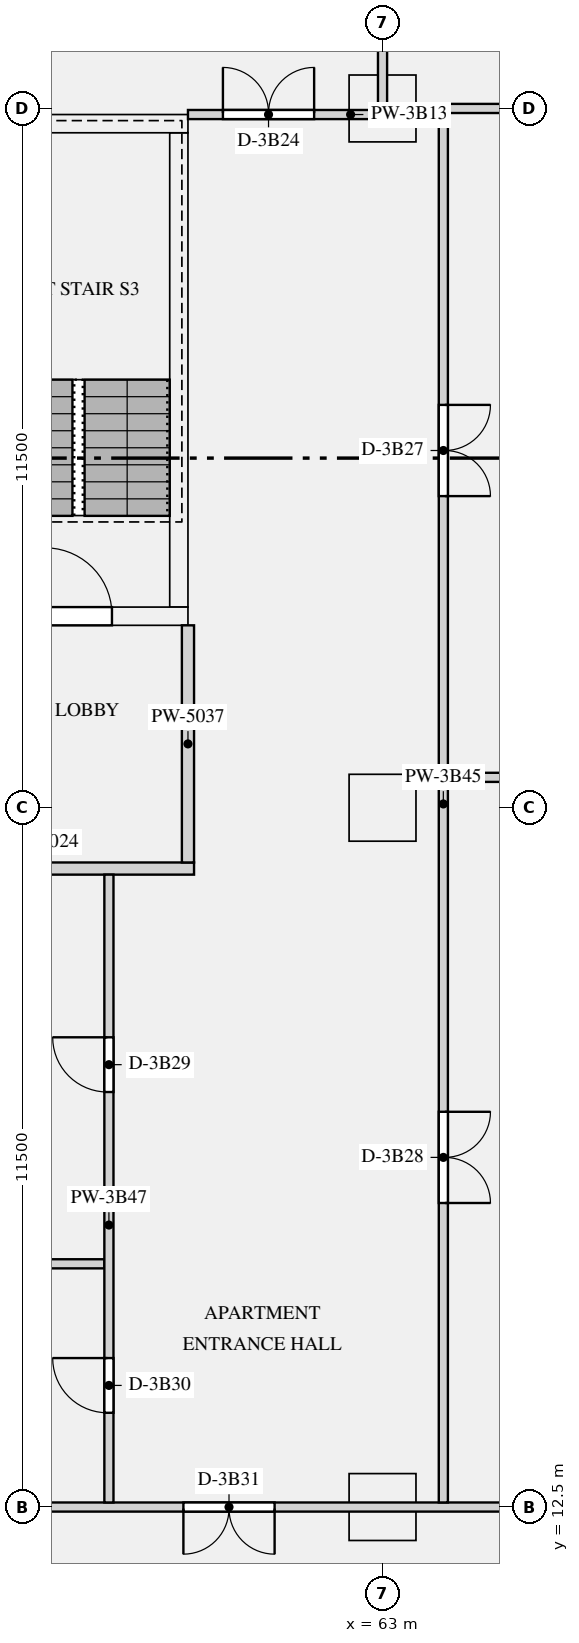
"""IFC4 building model, lengths in metres.
Left out: names, types, materials, properties, quantities, classifications, styles, units other than length and angle.
Written with IfcOpenShell. Run it as: python <this file> out.ifc"""

import sys

from ifc_helpers import new_model, si_unit, direction, frame, frame_2d, origin, origin_2d, place, context, subcontext, project, spatial, rectangle, extrude, element, fill, save


model = new_model("IFC4")
c1 = context("Model", 3, precision=1e-05, world=origin(), true_north=direction((0.0, 1.0)))
c2 = subcontext(c1, "Body", "Model", "MODEL_VIEW")
j1 = project(units=[si_unit("LENGTHUNIT", "METRE"), si_unit("PLANEANGLEUNIT", "RADIAN")], contexts=[c1])
p1 = place(None, origin())
s1 = spatial("IfcSite", under=j1, at=p1, CompositionType="ELEMENT")
p2 = place(p1, origin())
s2 = spatial("IfcBuilding", under=s1, at=p2, CompositionType="ELEMENT")
p3 = place(p2, frame((0.0, 0.0, 150.75)))
s3 = spatial("IfcBuildingStorey", under=s2, at=p3, CompositionType="ELEMENT", Elevation=150.75)
for number, where, z_axis, x_axis in (
    (1, (63.0, 24.0, 0.0), (0.0, 0.0, 1.0), (1.0, 0.0, 0.0)),
    (2, (63.0, 35.5, 0.0), (0.0, 0.0, 1.0), (1.0, 0.0, 0.0)),
    (3, (63.0, 12.5, 0.0), (0.0, 0.0, 1.0), (1.0, 0.0, 0.0)),
):
    element("IfcColumn", number, at=place(p3, frame(where, z_axis=z_axis, x_axis=x_axis)), inside=s3, PredefinedType="COLUMN", context=c2, shape_type="SweptSolid", body=[
        extrude(rectangle(XDim=1.1, YDim=1.1, at=origin_2d()), origin(), (0.0, 0.0, 1.0), 3.15),
    ])
p4 = place(p3, frame((56.2, 27.15, 0.0), z_axis=(0.0, 0.0, 1.0), x_axis=(1.0, 0.0, 0.0)))
e4 = element("IfcWall", 4, at=p4, inside=s3, PredefinedType="SHEAR", context=c2, shape_type="SweptSolid", body=[
    extrude(rectangle(XDim=3.6, YDim=0.3, at=frame_2d((1.8, 0.0))), origin(), (0.0, 0.0, 1.0), 3.15),
])
p5 = place(p4, frame((1.25, 0.0, 0.0)))
e5 = element("IfcOpeningElement", 5, at=p5, cuts=e4, PredefinedType="OPENING", context=c2, shape_type="SweptSolid", body=[
    extrude(rectangle(XDim=1.1, YDim=2.1, at=frame_2d((0.55, 1.05))), frame((0.0, 0.16, 0.0), z_axis=(0.0, -1.0, 0.0), x_axis=(1.0, 0.0, 0.0)), (0.0, 0.0, 1.0), 0.32),
])
p6 = place(p3, frame((56.2, 35.25, 0.0), z_axis=(0.0, 0.0, 1.0), x_axis=(1.0, 0.0, 0.0)))
e6 = element("IfcWall", 6, at=p6, inside=s3, PredefinedType="SHEAR", context=c2, shape_type="SweptSolid", body=[
    extrude(rectangle(XDim=3.6, YDim=0.3, at=frame_2d((1.8, 0.0))), origin(), (0.0, 0.0, 1.0), 3.15),
])
p7 = place(p3, frame((59.65, 27.3, 0.0), z_axis=(0.0, 0.0, 1.0), x_axis=(0.0, 1.0, 0.0)))
e7 = element("IfcWall", 7, at=p7, inside=s3, PredefinedType="SHEAR", context=c2, shape_type="SweptSolid", body=[
    extrude(rectangle(XDim=7.8, YDim=0.3, at=frame_2d((3.9, 0.0))), origin(), (0.0, 0.0, 1.0), 3.15),
])
p8 = place(p3, frame((54.9, 23.0, 0.0), z_axis=(0.0, 0.0, 1.0), x_axis=(1.0, 0.0, 0.0)))
e8 = element("IfcWall", 8, at=p8, inside=s3, PredefinedType="PARTITIONING", context=c2, shape_type="SweptSolid", body=[
    extrude(rectangle(XDim=5.0, YDim=0.2, at=frame_2d((2.5, 0.0))), origin(), (0.0, 0.0, 1.0), 2.83),
])
p9 = place(p3, frame((59.8, 23.1, 0.0), z_axis=(0.0, 0.0, 1.0), x_axis=(0.0, 1.0, 0.0)))
e9 = element("IfcWall", 9, at=p9, inside=s3, PredefinedType="PARTITIONING", context=c2, shape_type="SweptSolid", body=[
    extrude(rectangle(XDim=3.9, YDim=0.2, at=frame_2d((1.95, 0.0))), origin(), (0.0, 0.0, 1.0), 2.83),
])
p10 = place(p3, frame((59.8, 35.4, 0.0), z_axis=(0.0, 0.0, 1.0), x_axis=(1.0, 0.0, 0.0)))
e10 = element("IfcWall", 10, at=p10, inside=s3, PredefinedType="PARTITIONING", context=c2, shape_type="SweptSolid", body=[
    extrude(rectangle(XDim=3.275, YDim=0.15, at=frame_2d((1.637, 0.0))), origin(), (0.0, 0.0, 1.0), 2.83),
])
p11 = place(p10, frame((0.575, 0.0, 0.0)))
e11 = element("IfcOpeningElement", 11, at=p11, cuts=e10, PredefinedType="OPENING", context=c2, shape_type="SweptSolid", body=[
    extrude(rectangle(XDim=1.5, YDim=2.1, at=frame_2d((0.75, 1.05))), frame((0.0, 0.085, 0.0), z_axis=(0.0, -1.0, 0.0), x_axis=(1.0, 0.0, 0.0)), (0.0, 0.0, 1.0), 0.17),
])
p12 = place(p3, frame((63.075, 35.5, 0.0), z_axis=(0.0, 0.0, 1.0), x_axis=(1.0, 0.0, 0.0)))
e12 = element("IfcWall", 12, at=p12, inside=s3, PredefinedType="PARTITIONING", context=c2, shape_type="SweptSolid", body=[
    extrude(rectangle(XDim=8.225, YDim=0.15, at=frame_2d((4.113, 0.0))), origin(), (0.0, 0.0, 1.0), 2.83),
])
p13 = place(p3, frame((64.075, 24.5, 0.0), z_axis=(0.0, 0.0, 1.0), x_axis=(1.0, 0.0, 0.0)))
e13 = element("IfcWall", 13, at=p13, inside=s3, PredefinedType="PARTITIONING", context=c2, shape_type="SweptSolid", body=[
    extrude(rectangle(XDim=4.725, YDim=0.15, at=frame_2d((2.363, 0.0))), origin(), (0.0, 0.0, 1.0), 2.83),
])
p14 = place(p3, frame((54.1, 16.5, 0.0), z_axis=(0.0, 0.0, 1.0), x_axis=(1.0, 0.0, 0.0)))
e14 = element("IfcWall", 14, at=p14, inside=s3, PredefinedType="PARTITIONING", context=c2, shape_type="SweptSolid", body=[
    extrude(rectangle(XDim=4.325, YDim=0.15, at=frame_2d((2.163, 0.0))), origin(), (0.0, 0.0, 1.0), 2.83),
])
p15 = place(p3, frame((54.0, 12.5, 0.0), z_axis=(0.0, 0.0, 1.0), x_axis=(1.0, 0.0, 0.0)))
e15 = element("IfcWall", 15, at=p15, inside=s3, PredefinedType="PARTITIONING", context=c2, shape_type="SweptSolid", body=[
    extrude(rectangle(XDim=17.3, YDim=0.15, at=frame_2d((8.65, 0.0))), origin(), (0.0, 0.0, 1.0), 2.83),
])
p16 = place(p15, frame((5.725, 0.0, 0.0)))
e16 = element("IfcOpeningElement", 16, at=p16, cuts=e15, PredefinedType="OPENING", context=c2, shape_type="SweptSolid", body=[
    extrude(rectangle(XDim=1.5, YDim=2.1, at=frame_2d((0.75, 1.05))), frame((0.0, 0.085, 0.0), z_axis=(0.0, -1.0, 0.0), x_axis=(1.0, 0.0, 0.0)), (0.0, 0.0, 1.0), 0.17),
])
p17 = place(p3, frame((63.0, 35.475, 0.0), z_axis=(0.0, 0.0, 1.0), x_axis=(0.0, 1.0, 0.0)))
e17 = element("IfcWall", 17, at=p17, inside=s3, PredefinedType="PARTITIONING", context=c2, shape_type="SweptSolid", body=[
    extrude(rectangle(XDim=7.325, YDim=0.15, at=frame_2d((3.663, 0.0))), origin(), (0.0, 0.0, 1.0), 2.83),
])
p18 = place(p17, frame((1.6, 0.0, 0.0)))
e18 = element("IfcOpeningElement", 18, at=p18, cuts=e17, PredefinedType="OPENING", context=c2, shape_type="SweptSolid", body=[
    extrude(rectangle(XDim=0.9, YDim=2.1, at=frame_2d((0.45, 1.05))), frame((0.0, 0.085, 0.0), z_axis=(0.0, -1.0, 0.0), x_axis=(1.0, 0.0, 0.0)), (0.0, 0.0, 1.0), 0.17),
])
p19 = place(p3, frame((64.0, 12.575, 0.0), z_axis=(0.0, 0.0, 1.0), x_axis=(0.0, 1.0, 0.0)))
e19 = element("IfcWall", 19, at=p19, inside=s3, PredefinedType="PARTITIONING", context=c2, shape_type="SweptSolid", body=[
    extrude(rectangle(XDim=22.85, YDim=0.15, at=frame_2d((11.425, 0.0))), origin(), (0.0, 0.0, 1.0), 2.83),
])
p20 = place(p19, frame((16.55, 0.0, 0.0)))
e20 = element("IfcOpeningElement", 20, at=p20, cuts=e19, PredefinedType="OPENING", context=c2, shape_type="SweptSolid", body=[
    extrude(rectangle(XDim=1.5, YDim=2.1, at=frame_2d((0.75, 1.05))), frame((0.0, 0.085, 0.0), z_axis=(0.0, -1.0, 0.0), x_axis=(1.0, 0.0, 0.0)), (0.0, 0.0, 1.0), 0.17),
])
p21 = place(p19, frame((4.925, 0.0, 0.0)))
e21 = element("IfcOpeningElement", 21, at=p21, cuts=e19, PredefinedType="OPENING", context=c2, shape_type="SweptSolid", body=[
    extrude(rectangle(XDim=1.5, YDim=2.1, at=frame_2d((0.75, 1.05))), frame((0.0, 0.085, 0.0), z_axis=(0.0, -1.0, 0.0), x_axis=(1.0, 0.0, 0.0)), (0.0, 0.0, 1.0), 0.17),
])
p22 = place(p3, frame((58.5, 12.575, 0.0), z_axis=(0.0, 0.0, 1.0), x_axis=(0.0, 1.0, 0.0)))
e22 = element("IfcWall", 22, at=p22, inside=s3, PredefinedType="PARTITIONING", context=c2, shape_type="SweptSolid", body=[
    extrude(rectangle(XDim=10.325, YDim=0.15, at=frame_2d((5.163, 0.0))), origin(), (0.0, 0.0, 1.0), 2.83),
])
p23 = place(p22, frame((6.75, 0.0, 0.0)))
e23 = element("IfcOpeningElement", 23, at=p23, cuts=e22, PredefinedType="OPENING", context=c2, shape_type="SweptSolid", body=[
    extrude(rectangle(XDim=0.9, YDim=2.1, at=frame_2d((0.45, 1.05))), frame((0.0, 0.085, 0.0), z_axis=(0.0, -1.0, 0.0), x_axis=(1.0, 0.0, 0.0)), (0.0, 0.0, 1.0), 0.17),
])
p24 = place(p22, frame((1.475, 0.0, 0.0)))
e24 = element("IfcOpeningElement", 24, at=p24, cuts=e22, PredefinedType="OPENING", context=c2, shape_type="SweptSolid", body=[
    extrude(rectangle(XDim=0.9, YDim=2.1, at=frame_2d((0.45, 1.05))), frame((0.0, 0.085, 0.0), z_axis=(0.0, -1.0, 0.0), x_axis=(1.0, 0.0, 0.0)), (0.0, 0.0, 1.0), 0.17),
])
p25 = place(p5, origin())
e25 = element("IfcDoor", 25, at=p25, inside=s3, OperationType="SINGLE_SWING_LEFT", PredefinedType="DOOR", context=c2, shape_type="SweptSolid", body=[
    extrude(rectangle(XDim=1.1, YDim=2.1, at=frame_2d((0.55, 1.05))), frame((0.0, 0.025, 0.0), z_axis=(0.0, -1.0, 0.0), x_axis=(1.0, 0.0, 0.0)), (0.0, 0.0, 1.0), 0.05),
])
fill(e5, e25)
p26 = place(p11, origin())
e26 = element("IfcDoor", 26, at=p26, inside=s3, OperationType="DOUBLE_DOOR_SINGLE_SWING", PredefinedType="DOOR", context=c2, shape_type="SweptSolid", body=[
    extrude(rectangle(XDim=1.5, YDim=2.1, at=frame_2d((0.75, 1.05))), frame((0.0, 0.025, 0.0), z_axis=(0.0, -1.0, 0.0), x_axis=(1.0, 0.0, 0.0)), (0.0, 0.0, 1.0), 0.05),
])
fill(e11, e26)
p27 = place(p20, frame((1.5, 0.0, 0.0), z_axis=(0.0, 0.0, 1.0), x_axis=(-1.0, 0.0, 0.0)))
e27 = element("IfcDoor", 27, at=p27, inside=s3, OperationType="DOUBLE_DOOR_SINGLE_SWING", PredefinedType="DOOR", context=c2, shape_type="SweptSolid", body=[
    extrude(rectangle(XDim=1.5, YDim=2.1, at=frame_2d((0.75, 1.05))), frame((0.0, 0.025, 0.0), z_axis=(0.0, -1.0, 0.0), x_axis=(1.0, 0.0, 0.0)), (0.0, 0.0, 1.0), 0.05),
])
fill(e20, e27)
p28 = place(p21, frame((1.5, 0.0, 0.0), z_axis=(0.0, 0.0, 1.0), x_axis=(-1.0, 0.0, 0.0)))
e28 = element("IfcDoor", 28, at=p28, inside=s3, OperationType="DOUBLE_DOOR_SINGLE_SWING", PredefinedType="DOOR", context=c2, shape_type="SweptSolid", body=[
    extrude(rectangle(XDim=1.5, YDim=2.1, at=frame_2d((0.75, 1.05))), frame((0.0, 0.025, 0.0), z_axis=(0.0, -1.0, 0.0), x_axis=(1.0, 0.0, 0.0)), (0.0, 0.0, 1.0), 0.05),
])
fill(e21, e28)
p29 = place(p23, origin())
e29 = element("IfcDoor", 29, at=p29, inside=s3, OperationType="SINGLE_SWING_RIGHT", PredefinedType="DOOR", context=c2, shape_type="SweptSolid", body=[
    extrude(rectangle(XDim=0.9, YDim=2.1, at=frame_2d((0.45, 1.05))), frame((0.0, 0.025, 0.0), z_axis=(0.0, -1.0, 0.0), x_axis=(1.0, 0.0, 0.0)), (0.0, 0.0, 1.0), 0.05),
])
fill(e23, e29)
p30 = place(p24, origin())
e30 = element("IfcDoor", 30, at=p30, inside=s3, OperationType="SINGLE_SWING_RIGHT", PredefinedType="DOOR", context=c2, shape_type="SweptSolid", body=[
    extrude(rectangle(XDim=0.9, YDim=2.1, at=frame_2d((0.45, 1.05))), frame((0.0, 0.025, 0.0), z_axis=(0.0, -1.0, 0.0), x_axis=(1.0, 0.0, 0.0)), (0.0, 0.0, 1.0), 0.05),
])
fill(e24, e30)
p31 = place(p16, frame((1.5, 0.0, 0.0), z_axis=(0.0, 0.0, 1.0), x_axis=(-1.0, 0.0, 0.0)))
e31 = element("IfcDoor", 31, at=p31, inside=s3, OperationType="DOUBLE_DOOR_SINGLE_SWING", PredefinedType="DOOR", context=c2, shape_type="SweptSolid", body=[
    extrude(rectangle(XDim=1.5, YDim=2.1, at=frame_2d((0.75, 1.05))), frame((0.0, 0.025, 0.0), z_axis=(0.0, -1.0, 0.0), x_axis=(1.0, 0.0, 0.0)), (0.0, 0.0, 1.0), 0.05),
])
fill(e16, e31)
save(model, sys.argv[1])
